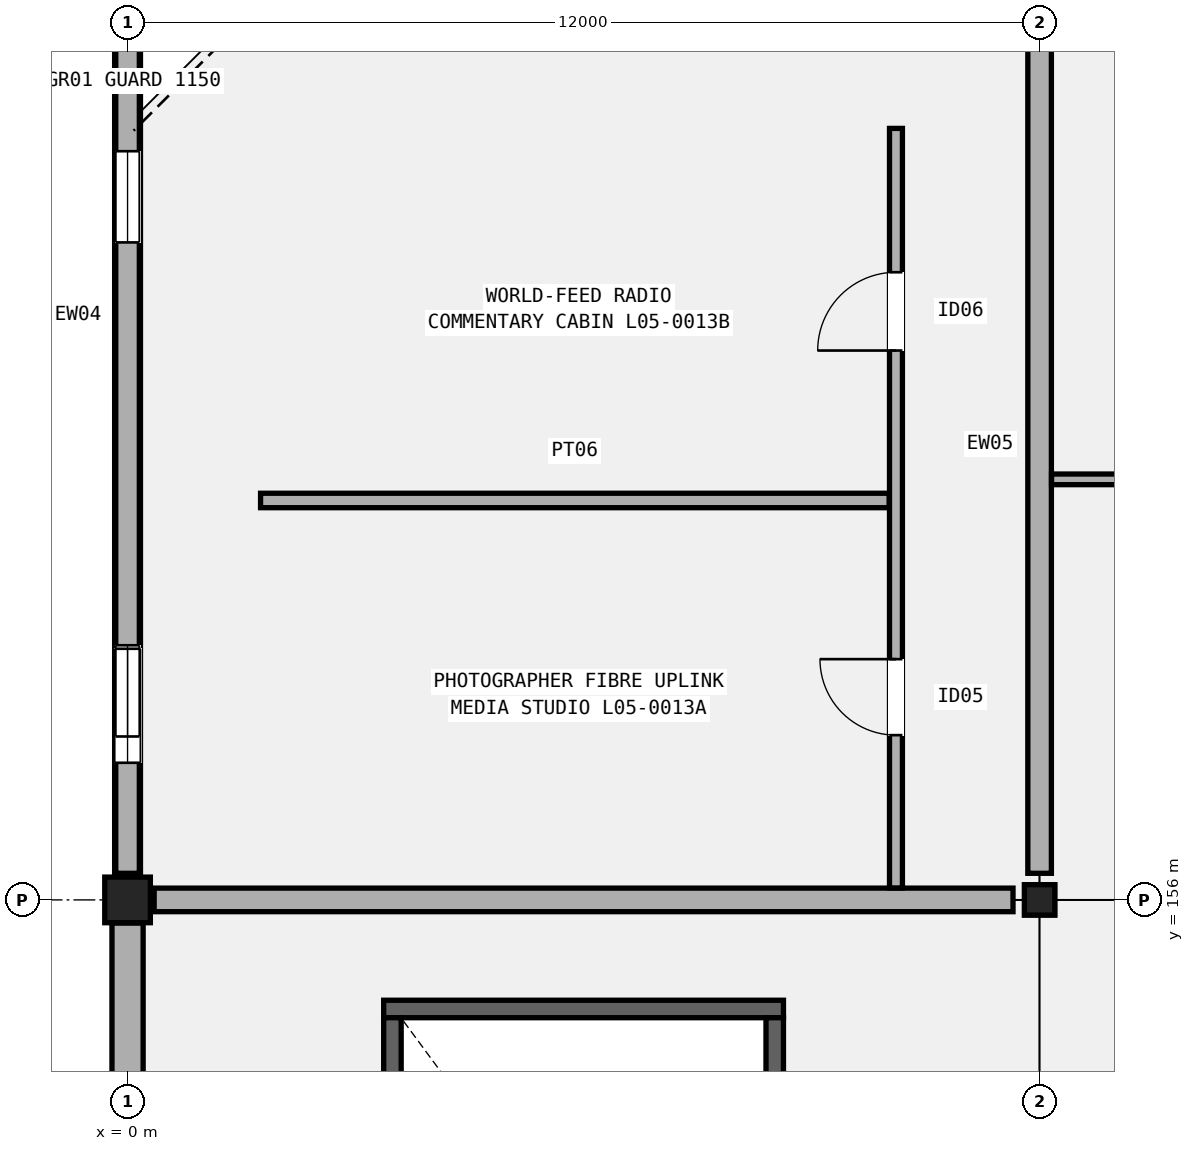
"""IFC4 building model, lengths in metres.
Left out: names, types, materials, properties, quantities, classifications, styles, units other than length and angle.
Written with IfcOpenShell. Run it as: python <this file> out.ifc"""

import sys

from ifc_helpers import new_model, si_unit, direction, frame, frame_2d, origin, origin_2d, place, context, subcontext, project, spatial, rectangle, hollow_rectangle, extrude, element, fill, save


model = new_model("IFC4")
c1 = context("Model", 3, precision=1e-05, world=origin(), true_north=direction((0.0, 1.0)))
c2 = subcontext(c1, "Body", "Model", "MODEL_VIEW")
j1 = project(units=[si_unit("LENGTHUNIT", "METRE"), si_unit("PLANEANGLEUNIT", "RADIAN")], contexts=[c1])
p1 = place(None, origin())
s1 = spatial("IfcSite", under=j1, at=p1, CompositionType="ELEMENT")
p2 = place(p1, origin())
s2 = spatial("IfcBuilding", under=s1, at=p2, CompositionType="ELEMENT")
p3 = place(p2, frame((0.0, 0.0, 25.8)))
s3 = spatial("IfcBuildingStorey", under=s2, at=p3, CompositionType="ELEMENT", Elevation=25.8)
p4 = place(p3, frame((0.0, 156.0, 0.0), z_axis=(0.0, 0.0, 1.0), x_axis=(1.0, 0.0, 0.0)))
e1 = element("IfcColumn", 1, at=p4, inside=s3, PredefinedType="COLUMN", context=c2, shape_type="SweptSolid", body=[
    extrude(rectangle(XDim=0.6, YDim=0.6, at=origin_2d()), origin(), (0.0, 0.0, 1.0), 5.4),
])
p5 = place(p3, frame((12.0, 156.0, 0.0), z_axis=(0.0, 0.0, 1.0), x_axis=(1.0, 0.0, 0.0)))
e2 = element("IfcColumn", 2, at=p5, inside=s3, PredefinedType="COLUMN", context=c2, shape_type="SweptSolid", body=[
    extrude(hollow_rectangle(XDim=0.4, YDim=0.4, WallThickness=0.016, InnerFilletRadius=0.016, OuterFilletRadius=0.032, at=origin_2d()), origin(), (0.0, 0.0, 1.0), 5.4),
])
p6 = place(p3, frame((0.0, 144.354, 0.0), z_axis=(0.0, 0.0, 1.0), x_axis=(0.0, 1.0, 0.0)))
e3 = element("IfcWall", 3, at=p6, inside=s3, PredefinedType="SOLIDWALL", context=c2, shape_type="SweptSolid", body=[
    extrude(rectangle(XDim=11.342, YDim=0.41, at=frame_2d((5.671, 0.0))), origin(), (0.0, 0.0, 1.0), 4.34),
])
p7 = place(p6, frame((1.5, 0.0, 0.95)))
e4 = element("IfcOpeningElement", 4, at=p7, cuts=e3, PredefinedType="OPENING", context=c2, shape_type="SweptSolid", body=[
    extrude(rectangle(XDim=1.35, YDim=2.0, at=frame_2d((0.675, 1.0))), frame((0.0, 0.215, 0.0), z_axis=(0.0, -1.0, 0.0), x_axis=(1.0, 0.0, 0.0)), (0.0, 0.0, 1.0), 0.43),
])
p8 = place(p3, frame((0.0, 156.304, 0.0), z_axis=(0.0, 0.0, 1.0), x_axis=(0.0, 1.0, 0.0)))
e5 = element("IfcWall", 5, at=p8, inside=s3, PredefinedType="SOLIDWALL", context=c2, shape_type="SweptSolid", body=[
    extrude(rectangle(XDim=11.492, YDim=0.34, at=frame_2d((5.746, 0.0))), origin(), (0.0, 0.0, 1.0), 4.44),
])
p9 = place(p8, frame((1.5, 0.0, 0.95)))
e6 = element("IfcOpeningElement", 6, at=p9, cuts=e5, PredefinedType="OPENING", context=c2, shape_type="SweptSolid", body=[
    extrude(rectangle(XDim=1.5, YDim=1.8, at=frame_2d((0.75, 0.9))), frame((0.0, 0.18, 0.0), z_axis=(0.0, -1.0, 0.0), x_axis=(1.0, 0.0, 0.0)), (0.0, 0.0, 1.0), 0.36),
])
p10 = place(p3, frame((0.35, 156.0, 7.7), z_axis=(0.0, 0.0, 1.0), x_axis=(1.0, 0.0, 0.0)))
e7 = element("IfcWall", 7, at=p10, inside=s3, PredefinedType="SOLIDWALL", context=c2, shape_type="SweptSolid", body=[
    extrude(rectangle(XDim=11.3, YDim=0.31, at=frame_2d((5.65, 0.0))), origin(), (0.0, 0.0, 1.0), 1.58),
])
p11 = place(p3, frame((0.0, 156.35, 7.7), z_axis=(0.0, 0.0, 1.0), x_axis=(0.0, 1.0, 0.0)))
e8 = element("IfcWall", 8, at=p11, inside=s3, PredefinedType="SOLIDWALL", context=c2, shape_type="SweptSolid", body=[
    extrude(rectangle(XDim=11.3, YDim=0.31, at=frame_2d((5.65, 0.0))), origin(), (0.0, 0.0, 1.0), 1.58),
])
p12 = place(p11, frame((1.8, 0.0, 0.12)))
e9 = element("IfcOpeningElement", 9, at=p12, cuts=e8, PredefinedType="OPENING", context=c2, shape_type="SweptSolid", body=[
    extrude(rectangle(XDim=1.2, YDim=1.3, at=frame_2d((0.6, 0.65))), frame((0.0, 0.165, 0.0), z_axis=(0.0, -1.0, 0.0), x_axis=(1.0, 0.0, 0.0)), (0.0, 0.0, 1.0), 0.33),
])
p13 = place(p11, frame((8.3, 0.0, 0.12)))
e10 = element("IfcOpeningElement", 10, at=p13, cuts=e8, PredefinedType="OPENING", context=c2, shape_type="SweptSolid", body=[
    extrude(rectangle(XDim=1.2, YDim=1.3, at=frame_2d((0.6, 0.65))), frame((0.0, 0.165, 0.0), z_axis=(0.0, -1.0, 0.0), x_axis=(1.0, 0.0, 0.0)), (0.0, 0.0, 1.0), 0.33),
])
p14 = place(p3, frame((12.0, 156.35, 7.7), z_axis=(0.0, 0.0, 1.0), x_axis=(0.0, 1.0, 0.0)))
e11 = element("IfcWall", 11, at=p14, inside=s3, PredefinedType="SOLIDWALL", context=c2, shape_type="SweptSolid", body=[
    extrude(rectangle(XDim=11.3, YDim=0.31, at=frame_2d((5.65, 0.0))), origin(), (0.0, 0.0, 1.0), 1.58),
])
p15 = place(p3, frame((3.37, 154.565, 0.0), z_axis=(0.0, 0.0, 1.0), x_axis=(1.0, 0.0, 0.0)))
e12 = element("IfcWall", 12, at=p15, inside=s3, PredefinedType="SHEAR", context=c2, shape_type="SweptSolid", body=[
    extrude(rectangle(XDim=5.26, YDim=0.23, at=frame_2d((2.63, 0.0))), origin(), (0.0, 0.0, 1.0), 5.04),
])
for number, where, z_axis, x_axis in (
    (13, (3.485, 145.55, 0.0), (0.0, 0.0, 1.0), (0.0, 1.0, 0.0)),
    (14, (8.515, 145.55, 0.0), (0.0, 0.0, 1.0), (0.0, 1.0, 0.0)),
):
    element("IfcWall", number, at=place(p3, frame(where, z_axis=z_axis, x_axis=x_axis)), inside=s3, PredefinedType="SHEAR", context=c2, shape_type="SweptSolid", body=[
        extrude(rectangle(XDim=8.9, YDim=0.23, at=frame_2d((4.45, 0.0))), origin(), (0.0, 0.0, 1.0), 5.04),
    ])
p16 = place(p3, frame((10.11, 156.157, 0.0), z_axis=(0.0, 0.0, 1.0), x_axis=(0.0, 1.0, 0.0)))
e15 = element("IfcWall", 15, at=p16, inside=s3, PredefinedType="PARTITIONING", context=c2, shape_type="SweptSolid", body=[
    extrude(rectangle(XDim=9.993, YDim=0.17, at=frame_2d((4.997, 0.0))), origin(), (0.0, 0.0, 1.0), 4.35),
])
p17 = place(p16, frame((2.01, 0.0, 0.0)))
e16 = element("IfcOpeningElement", 16, at=p17, cuts=e15, PredefinedType="OPENING", context=c2, shape_type="SweptSolid", body=[
    extrude(rectangle(XDim=1.0, YDim=2.14, at=frame_2d((0.5, 1.07))), frame((0.0, 0.095, 0.0), z_axis=(0.0, -1.0, 0.0), x_axis=(1.0, 0.0, 0.0)), (0.0, 0.0, 1.0), 0.19),
])
p18 = place(p16, frame((7.071, 0.0, 0.0)))
e17 = element("IfcOpeningElement", 17, at=p18, cuts=e15, PredefinedType="OPENING", context=c2, shape_type="SweptSolid", body=[
    extrude(rectangle(XDim=1.03, YDim=2.12, at=frame_2d((0.515, 1.06))), frame((0.0, 0.095, 0.0), z_axis=(0.0, -1.0, 0.0), x_axis=(1.0, 0.0, 0.0)), (0.0, 0.0, 1.0), 0.19),
])
p19 = place(p3, frame((1.75, 161.255, 0.0), z_axis=(0.0, 0.0, 1.0), x_axis=(1.0, 0.0, 0.0)))
e18 = element("IfcWall", 18, at=p19, inside=s3, PredefinedType="PARTITIONING", context=c2, shape_type="SweptSolid", body=[
    extrude(rectangle(XDim=8.27, YDim=0.19, at=frame_2d((4.135, 0.0))), origin(), (0.0, 0.0, 1.0), 4.35),
])
p20 = place(p3, frame((12.157, 161.533, 0.0), z_axis=(0.0, 0.0, 1.0), x_axis=(1.0, 0.0, 0.0)))
e19 = element("IfcWall", 19, at=p20, inside=s3, PredefinedType="PARTITIONING", context=c2, shape_type="SweptSolid", body=[
    extrude(rectangle(XDim=9.888, YDim=0.14, at=frame_2d((4.944, 0.0))), origin(), (0.0, 0.0, 1.0), 4.35),
])
p21 = place(p9, origin())
e20 = element("IfcWindow", 20, at=p21, inside=s3, PartitioningType="SINGLE_PANEL", PredefinedType="WINDOW", context=c2, shape_type="SweptSolid", body=[
    extrude(rectangle(XDim=1.5, YDim=1.8, at=frame_2d((0.75, 0.9))), frame((0.0, 0.03, 0.0), z_axis=(0.0, -1.0, 0.0), x_axis=(1.0, 0.0, 0.0)), (0.0, 0.0, 1.0), 0.06),
])
fill(e6, e20)
p22 = place(p12, origin())
e21 = element("IfcWindow", 21, at=p22, inside=s3, PartitioningType="SINGLE_PANEL", PredefinedType="WINDOW", context=c2, shape_type="SweptSolid", body=[
    extrude(rectangle(XDim=1.2, YDim=1.3, at=frame_2d((0.6, 0.65))), frame((0.0, 0.03, 0.0), z_axis=(0.0, -1.0, 0.0), x_axis=(1.0, 0.0, 0.0)), (0.0, 0.0, 1.0), 0.06),
])
fill(e9, e21)
p23 = place(p13, origin())
e22 = element("IfcWindow", 22, at=p23, inside=s3, PartitioningType="SINGLE_PANEL", PredefinedType="WINDOW", context=c2, shape_type="SweptSolid", body=[
    extrude(rectangle(XDim=1.2, YDim=1.3, at=frame_2d((0.6, 0.65))), frame((0.0, 0.03, 0.0), z_axis=(0.0, -1.0, 0.0), x_axis=(1.0, 0.0, 0.0)), (0.0, 0.0, 1.0), 0.06),
])
fill(e10, e22)
p24 = place(p17, origin())
e23 = element("IfcDoor", 23, at=p24, inside=s3, OperationType="SINGLE_SWING_RIGHT", PredefinedType="DOOR", context=c2, shape_type="SweptSolid", body=[
    extrude(rectangle(XDim=1.0, YDim=2.14, at=frame_2d((0.5, 1.07))), frame((0.0, 0.025, 0.0), z_axis=(0.0, -1.0, 0.0), x_axis=(1.0, 0.0, 0.0)), (0.0, 0.0, 1.0), 0.05),
])
fill(e16, e23)
p25 = place(p18, origin())
e24 = element("IfcDoor", 24, at=p25, inside=s3, OperationType="SINGLE_SWING_LEFT", PredefinedType="DOOR", context=c2, shape_type="SweptSolid", body=[
    extrude(rectangle(XDim=1.03, YDim=2.12, at=frame_2d((0.515, 1.06))), frame((0.0, 0.025, 0.0), z_axis=(0.0, -1.0, 0.0), x_axis=(1.0, 0.0, 0.0)), (0.0, 0.0, 1.0), 0.05),
])
fill(e17, e24)
save(model, sys.argv[1])
